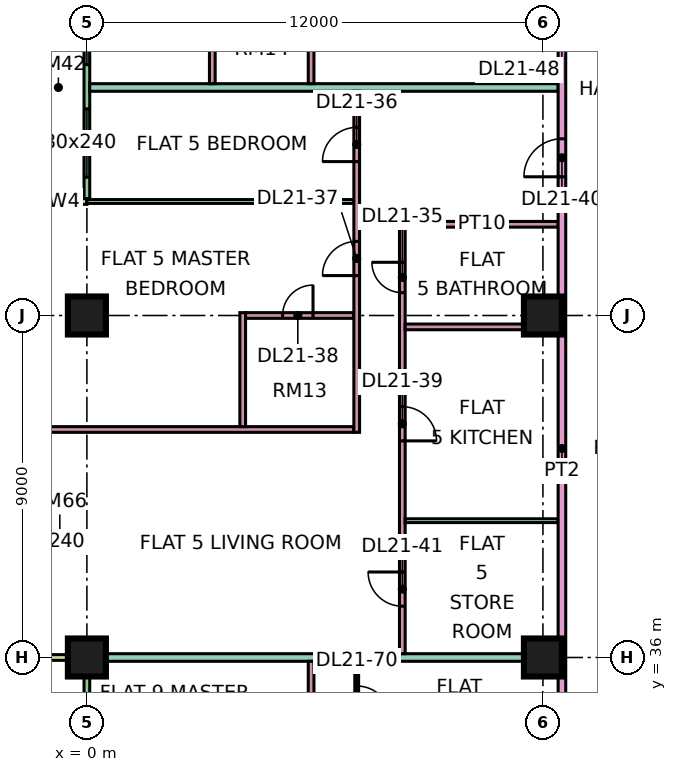
"""IFC4 building model, lengths in metres.
Left out: names, types, materials, properties, quantities, classifications, styles, units other than length and angle.
Written with IfcOpenShell. Run it as: python <this file> out.ifc"""

import sys

from ifc_helpers import new_model, si_unit, direction, frame, frame_2d, origin, origin_2d, place, context, subcontext, project, spatial, rectangle, extrude, element, fill, save


model = new_model("IFC4")
c1 = context("Model", 3, precision=1e-05, world=origin(), true_north=direction((0.0, 1.0)))
c2 = subcontext(c1, "Body", "Model", "MODEL_VIEW")
j1 = project(units=[si_unit("LENGTHUNIT", "METRE"), si_unit("PLANEANGLEUNIT", "RADIAN")], contexts=[c1])
p1 = place(None, origin())
s1 = spatial("IfcSite", under=j1, at=p1, CompositionType="ELEMENT")
p2 = place(p1, origin())
s2 = spatial("IfcBuilding", under=s1, at=p2, CompositionType="ELEMENT")
p3 = place(p2, frame((0.0, 0.0, 95.65)))
s3 = spatial("IfcBuildingStorey", under=s2, at=p3, CompositionType="ELEMENT", Elevation=95.65)
p4 = place(p3, frame((0.0, 36.0, 0.0), z_axis=(0.0, 0.0, 1.0), x_axis=(1.0, 0.0, 0.0)))
e1 = element("IfcColumn", 1, at=p4, inside=s3, PredefinedType="COLUMN", context=c2, shape_type="SweptSolid", body=[
    extrude(rectangle(XDim=1.0, YDim=1.0, at=origin_2d()), origin(), (0.0, 0.0, 1.0), 3.75),
])
for number, where, z_axis, x_axis in (
    (2, (0.0, 45.0, 0.0), (0.0, 0.0, 1.0), (1.0, 0.0, 0.0)),
    (3, (12.0, 36.0, 0.0), (0.0, 0.0, 1.0), (1.0, 0.0, 0.0)),
    (4, (12.0, 45.0, 0.0), (0.0, 0.0, 1.0), (1.0, 0.0, 0.0)),
):
    element("IfcColumn", number, at=place(p3, frame(where, z_axis=z_axis, x_axis=x_axis)), inside=s3, PredefinedType="COLUMN", context=c2, shape_type="SweptSolid", body=[
        extrude(rectangle(XDim=1.0, YDim=1.0, at=origin_2d()), origin(), (0.0, 0.0, 1.0), 3.75),
    ])
p5 = place(p3, frame((0.0, 61.425, 0.0), z_axis=(0.0, 0.0, 1.0), x_axis=(0.0, -1.0, 0.0)))
e5 = element("IfcWall", 5, at=p5, inside=s3, PredefinedType="SOLIDWALL", context=c2, shape_type="SweptSolid", body=[
    extrude(rectangle(XDim=13.35, YDim=0.15, at=frame_2d((6.675, 0.0))), origin(), (0.0, 0.0, 1.0), 3.35),
])
p6 = place(p5, frame((2.025, 0.0, 0.0)))
e6 = element("IfcOpeningElement", 6, at=p6, cuts=e5, PredefinedType="OPENING", context=c2, shape_type="SweptSolid", body=[
    extrude(rectangle(XDim=1.8, YDim=2.4, at=frame_2d((0.9, 1.2))), frame((0.0, 0.085, 0.0), z_axis=(0.0, -1.0, 0.0), x_axis=(1.0, 0.0, 0.0)), (0.0, 0.0, 1.0), 0.17),
])
p7 = place(p5, frame((5.025, 0.0, 0.45)))
e7 = element("IfcOpeningElement", 7, at=p7, cuts=e5, PredefinedType="OPENING", context=c2, shape_type="SweptSolid", body=[
    extrude(rectangle(XDim=1.2, YDim=2.4, at=frame_2d((0.6, 1.2))), frame((0.0, 0.085, 0.0), z_axis=(0.0, -1.0, 0.0), x_axis=(1.0, 0.0, 0.0)), (0.0, 0.0, 1.0), 0.17),
])
p8 = place(p5, frame((8.625, 0.0, 0.45)))
e8 = element("IfcOpeningElement", 8, at=p8, cuts=e5, PredefinedType="OPENING", context=c2, shape_type="SweptSolid", body=[
    extrude(rectangle(XDim=1.2, YDim=2.4, at=frame_2d((0.6, 1.2))), frame((0.0, 0.085, 0.0), z_axis=(0.0, -1.0, 0.0), x_axis=(1.0, 0.0, 0.0)), (0.0, 0.0, 1.0), 0.17),
])
p9 = place(p5, frame((10.988, 0.0, 0.45)))
e9 = element("IfcOpeningElement", 9, at=p9, cuts=e5, PredefinedType="OPENING", context=c2, shape_type="SweptSolid", body=[
    extrude(rectangle(XDim=1.8, YDim=2.4, at=frame_2d((0.9, 1.2))), frame((0.0, 0.085, 0.0), z_axis=(0.0, -1.0, 0.0), x_axis=(1.0, 0.0, 0.0)), (0.0, 0.0, 1.0), 0.17),
])
p10 = place(p3, frame((-1.5, 48.0, 0.0), z_axis=(0.0, 0.0, 1.0), x_axis=(1.0, 0.0, 0.0)))
e10 = element("IfcWall", 10, at=p10, inside=s3, PredefinedType="SOLIDWALL", context=c2, shape_type="SweptSolid", body=[
    extrude(rectangle(XDim=1.5, YDim=0.15, at=frame_2d((0.75, 0.0))), origin(), (0.0, 0.0, 1.0), 3.35),
])
p11 = place(p3, frame((0.0, 35.925, 0.0), z_axis=(0.0, 0.0, 1.0), x_axis=(0.0, -1.0, 0.0)))
e11 = element("IfcWall", 11, at=p11, inside=s3, PredefinedType="SOLIDWALL", context=c2, shape_type="SweptSolid", body=[
    extrude(rectangle(XDim=11.85, YDim=0.15, at=frame_2d((5.925, 0.0))), origin(), (0.0, 0.0, 1.0), 3.35),
])
p12 = place(p11, frame((2.325, 0.0, 0.0)))
e12 = element("IfcOpeningElement", 12, at=p12, cuts=e11, PredefinedType="OPENING", context=c2, shape_type="SweptSolid", body=[
    extrude(rectangle(XDim=1.8, YDim=2.4, at=frame_2d((0.9, 1.2))), frame((0.0, 0.085, 0.0), z_axis=(0.0, -1.0, 0.0), x_axis=(1.0, 0.0, 0.0)), (0.0, 0.0, 1.0), 0.17),
])
p13 = place(p11, frame((7.125, 0.0, 0.45)))
e13 = element("IfcOpeningElement", 13, at=p13, cuts=e11, PredefinedType="OPENING", context=c2, shape_type="SweptSolid", body=[
    extrude(rectangle(XDim=3.0, YDim=2.4, at=frame_2d((1.5, 1.2))), frame((0.0, 0.085, 0.0), z_axis=(0.0, -1.0, 0.0), x_axis=(1.0, 0.0, 0.0)), (0.0, 0.0, 1.0), 0.17),
])
p14 = place(p3, frame((-1.5, 36.0, 0.0), z_axis=(0.0, 0.0, 1.0), x_axis=(1.0, 0.0, 0.0)))
e14 = element("IfcWall", 14, at=p14, inside=s3, PredefinedType="SOLIDWALL", context=c2, shape_type="SweptSolid", body=[
    extrude(rectangle(XDim=1.5, YDim=0.15, at=frame_2d((0.75, 0.0))), origin(), (0.0, 0.0, 1.0), 3.35),
])
e15 = element("IfcWall", 15, at=p4, inside=s3, PredefinedType="PARTITIONING", context=c2, shape_type="SweptSolid", body=[
    extrude(rectangle(XDim=12.4, YDim=0.2, at=frame_2d((6.2, 0.0))), origin(), (0.0, 0.0, 1.0), 3.35),
])
p15 = place(p3, frame((-1.35, 42.0, 0.0), z_axis=(0.0, 0.0, 1.0), x_axis=(1.0, 0.0, 0.0)))
e16 = element("IfcWall", 16, at=p15, inside=s3, PredefinedType="PARTITIONING", context=c2, shape_type="SweptSolid", body=[
    extrude(rectangle(XDim=8.375, YDim=0.15, at=frame_2d((4.188, 0.0))), origin(), (0.0, 0.0, 1.0), 3.35),
])
p16 = place(p3, frame((0.0, 48.0, 0.0), z_axis=(0.0, 0.0, 1.0), x_axis=(1.0, 0.0, 0.0)))
e17 = element("IfcWall", 17, at=p16, inside=s3, PredefinedType="PARTITIONING", context=c2, shape_type="SweptSolid", body=[
    extrude(rectangle(XDim=7.025, YDim=0.1, at=frame_2d((3.512, 0.0))), origin(), (0.0, 0.0, 1.0), 3.35),
])
p17 = place(p3, frame((0.074, 51.0, 0.0), z_axis=(0.0, 0.0, 1.0), x_axis=(1.0, 0.0, 0.0)))
e18 = element("IfcWall", 18, at=p17, inside=s3, PredefinedType="PARTITIONING", context=c2, shape_type="SweptSolid", body=[
    extrude(rectangle(XDim=12.326, YDim=0.2, at=frame_2d((6.163, 0.0))), origin(), (0.0, 0.0, 1.0), 3.35),
])
p18 = place(p3, frame((3.3, 51.1, 0.0), z_axis=(0.0, 0.0, 1.0), x_axis=(0.0, 1.0, 0.0)))
e19 = element("IfcWall", 19, at=p18, inside=s3, PredefinedType="PARTITIONING", context=c2, shape_type="SweptSolid", body=[
    extrude(rectangle(XDim=2.975, YDim=0.15, at=frame_2d((1.487, 0.0))), origin(), (0.0, 0.0, 1.0), 3.35),
])
p19 = place(p3, frame((4.1, 42.075, 0.0), z_axis=(0.0, 0.0, 1.0), x_axis=(0.0, 1.0, 0.0)))
e20 = element("IfcWall", 20, at=p19, inside=s3, PredefinedType="PARTITIONING", context=c2, shape_type="SweptSolid", body=[
    extrude(rectangle(XDim=3.0, YDim=0.15, at=frame_2d((1.5, 0.0))), origin(), (0.0, 0.0, 1.0), 3.35),
])
p20 = place(p3, frame((4.175, 45.0, 0.0), z_axis=(0.0, 0.0, 1.0), x_axis=(1.0, 0.0, 0.0)))
e21 = element("IfcWall", 21, at=p20, inside=s3, PredefinedType="PARTITIONING", context=c2, shape_type="SweptSolid", body=[
    extrude(rectangle(XDim=2.85, YDim=0.15, at=frame_2d((1.425, 0.0))), origin(), (0.0, 0.0, 1.0), 3.35),
])
p21 = place(p20, frame((0.975, 0.0, 0.0)))
e22 = element("IfcOpeningElement", 22, at=p21, cuts=e21, PredefinedType="OPENING", context=c2, shape_type="SweptSolid", body=[
    extrude(rectangle(XDim=0.8, YDim=2.1, at=frame_2d((0.4, 1.05))), frame((0.0, 0.085, 0.0), z_axis=(0.0, -1.0, 0.0), x_axis=(1.0, 0.0, 0.0)), (0.0, 0.0, 1.0), 0.17),
])
p22 = place(p3, frame((5.9, 29.925, 0.0), z_axis=(0.0, 0.0, 1.0), x_axis=(0.0, 1.0, 0.0)))
e23 = element("IfcWall", 23, at=p22, inside=s3, PredefinedType="PARTITIONING", context=c2, shape_type="SweptSolid", body=[
    extrude(rectangle(XDim=5.975, YDim=0.15, at=frame_2d((2.987, 0.0))), origin(), (0.0, 0.0, 1.0), 3.35),
])
p23 = place(p22, frame((4.125, 0.0, 0.0)))
e24 = element("IfcOpeningElement", 24, at=p23, cuts=e23, PredefinedType="OPENING", context=c2, shape_type="SweptSolid", body=[
    extrude(rectangle(XDim=0.9, YDim=2.1, at=frame_2d((0.45, 1.05))), frame((0.0, 0.085, 0.0), z_axis=(0.0, -1.0, 0.0), x_axis=(1.0, 0.0, 0.0)), (0.0, 0.0, 1.0), 0.17),
])
p24 = place(p3, frame((5.9, 51.1, 0.0), z_axis=(0.0, 0.0, 1.0), x_axis=(0.0, 1.0, 0.0)))
e25 = element("IfcWall", 25, at=p24, inside=s3, PredefinedType="PARTITIONING", context=c2, shape_type="SweptSolid", body=[
    extrude(rectangle(XDim=8.95, YDim=0.15, at=frame_2d((4.475, 0.0))), origin(), (0.0, 0.0, 1.0), 3.35),
])
p25 = place(p24, frame((6.95, 0.0, 0.0)))
e26 = element("IfcOpeningElement", 26, at=p25, cuts=e25, PredefinedType="OPENING", context=c2, shape_type="SweptSolid", body=[
    extrude(rectangle(XDim=0.9, YDim=2.1, at=frame_2d((0.45, 1.05))), frame((0.0, 0.085, 0.0), z_axis=(0.0, -1.0, 0.0), x_axis=(1.0, 0.0, 0.0)), (0.0, 0.0, 1.0), 0.17),
])
p26 = place(p24, frame((3.95, 0.0, 0.0)))
e27 = element("IfcOpeningElement", 27, at=p26, cuts=e25, PredefinedType="OPENING", context=c2, shape_type="SweptSolid", body=[
    extrude(rectangle(XDim=0.9, YDim=2.1, at=frame_2d((0.45, 1.05))), frame((0.0, 0.085, 0.0), z_axis=(0.0, -1.0, 0.0), x_axis=(1.0, 0.0, 0.0)), (0.0, 0.0, 1.0), 0.17),
])
p27 = place(p3, frame((7.1, 33.65, 0.0), z_axis=(0.0, 0.0, 1.0), x_axis=(0.0, 1.0, 0.0)))
e28 = element("IfcWall", 28, at=p27, inside=s3, PredefinedType="PARTITIONING", context=c2, shape_type="SweptSolid", body=[
    extrude(rectangle(XDim=2.25, YDim=0.1, at=frame_2d((1.125, 0.0))), origin(), (0.0, 0.0, 1.0), 3.35),
])
p28 = place(p27, frame((0.7, 0.0, 0.0)))
e29 = element("IfcOpeningElement", 29, at=p28, cuts=e28, PredefinedType="OPENING", context=c2, shape_type="SweptSolid", body=[
    extrude(rectangle(XDim=0.9, YDim=2.1, at=frame_2d((0.45, 1.05))), frame((0.0, 0.06, 0.0), z_axis=(0.0, -1.0, 0.0), x_axis=(1.0, 0.0, 0.0)), (0.0, 0.0, 1.0), 0.12),
])
p29 = place(p3, frame((7.1, 41.925, 0.0), z_axis=(0.0, 0.0, 1.0), x_axis=(0.0, 1.0, 0.0)))
e30 = element("IfcWall", 30, at=p29, inside=s3, PredefinedType="PARTITIONING", context=c2, shape_type="SweptSolid", body=[
    extrude(rectangle(XDim=8.975, YDim=0.15, at=frame_2d((4.487, 0.0))), origin(), (0.0, 0.0, 1.0), 3.35),
])
p30 = place(p29, frame((7.125, 0.0, 0.0)))
e31 = element("IfcOpeningElement", 31, at=p30, cuts=e30, PredefinedType="OPENING", context=c2, shape_type="SweptSolid", body=[
    extrude(rectangle(XDim=0.9, YDim=2.1, at=frame_2d((0.45, 1.05))), frame((0.0, 0.085, 0.0), z_axis=(0.0, -1.0, 0.0), x_axis=(1.0, 0.0, 0.0)), (0.0, 0.0, 1.0), 0.17),
])
p31 = place(p29, frame((4.125, 0.0, 0.0)))
e32 = element("IfcOpeningElement", 32, at=p31, cuts=e30, PredefinedType="OPENING", context=c2, shape_type="SweptSolid", body=[
    extrude(rectangle(XDim=0.9, YDim=2.1, at=frame_2d((0.45, 1.05))), frame((0.0, 0.085, 0.0), z_axis=(0.0, -1.0, 0.0), x_axis=(1.0, 0.0, 0.0)), (0.0, 0.0, 1.0), 0.17),
])
p32 = place(p3, frame((8.3, 36.1, 0.0), z_axis=(0.0, 0.0, 1.0), x_axis=(0.0, 1.0, 0.0)))
e33 = element("IfcWall", 33, at=p32, inside=s3, PredefinedType="PARTITIONING", context=c2, shape_type="SweptSolid", body=[
    extrude(rectangle(XDim=11.375, YDim=0.15, at=frame_2d((5.688, 0.0))), origin(), (0.0, 0.0, 1.0), 3.35),
])
p33 = place(p32, frame((9.5, 0.0, 0.0)))
e34 = element("IfcOpeningElement", 34, at=p33, cuts=e33, PredefinedType="OPENING", context=c2, shape_type="SweptSolid", body=[
    extrude(rectangle(XDim=0.8, YDim=2.1, at=frame_2d((0.4, 1.05))), frame((0.0, 0.085, 0.0), z_axis=(0.0, -1.0, 0.0), x_axis=(1.0, 0.0, 0.0)), (0.0, 0.0, 1.0), 0.17),
])
p34 = place(p32, frame((5.6, 0.0, 0.0)))
e35 = element("IfcOpeningElement", 35, at=p34, cuts=e33, PredefinedType="OPENING", context=c2, shape_type="SweptSolid", body=[
    extrude(rectangle(XDim=0.9, YDim=2.1, at=frame_2d((0.45, 1.05))), frame((0.0, 0.085, 0.0), z_axis=(0.0, -1.0, 0.0), x_axis=(1.0, 0.0, 0.0)), (0.0, 0.0, 1.0), 0.17),
])
p35 = place(p32, frame((1.25, 0.0, 0.0)))
e36 = element("IfcOpeningElement", 36, at=p35, cuts=e33, PredefinedType="OPENING", context=c2, shape_type="SweptSolid", body=[
    extrude(rectangle(XDim=0.9, YDim=2.1, at=frame_2d((0.45, 1.05))), frame((0.0, 0.085, 0.0), z_axis=(0.0, -1.0, 0.0), x_axis=(1.0, 0.0, 0.0)), (0.0, 0.0, 1.0), 0.17),
])
p36 = place(p3, frame((8.375, 39.6, 0.0), z_axis=(0.0, 0.0, 1.0), x_axis=(1.0, 0.0, 0.0)))
e37 = element("IfcWall", 37, at=p36, inside=s3, PredefinedType="PARTITIONING", context=c2, shape_type="SweptSolid", body=[
    extrude(rectangle(XDim=4.025, YDim=0.1, at=frame_2d((2.012, 0.0))), origin(), (0.0, 0.0, 1.0), 3.35),
])
for number, where, z_axis, x_axis in (
    (38, (8.375, 44.7, 0.0), (0.0, 0.0, 1.0), (1.0, 0.0, 0.0)),
    (39, (8.375, 47.4, 0.0), (0.0, 0.0, 1.0), (1.0, 0.0, 0.0)),
):
    element("IfcWall", number, at=place(p3, frame(where, z_axis=z_axis, x_axis=x_axis)), inside=s3, PredefinedType="PARTITIONING", context=c2, shape_type="SweptSolid", body=[
        extrude(rectangle(XDim=4.025, YDim=0.15, at=frame_2d((2.012, 0.0))), origin(), (0.0, 0.0, 1.0), 3.35),
    ])
p37 = place(p3, frame((12.5, 20.0, 0.0), z_axis=(0.0, 0.0, 1.0), x_axis=(0.0, 1.0, 0.0)))
e40 = element("IfcWall", 40, at=p37, inside=s3, PredefinedType="PARTITIONING", context=c2, shape_type="SweptSolid", body=[
    extrude(rectangle(XDim=43.0, YDim=0.2, at=frame_2d((21.5, 0.0))), origin(), (0.0, 0.0, 1.0), 3.35),
])
p38 = place(p37, frame((28.65, 0.0, 0.0)))
e41 = element("IfcOpeningElement", 41, at=p38, cuts=e40, PredefinedType="OPENING", context=c2, shape_type="SweptSolid", body=[
    extrude(rectangle(XDim=1.0, YDim=2.1, at=frame_2d((0.5, 1.05))), frame((0.0, 0.11, 0.0), z_axis=(0.0, -1.0, 0.0), x_axis=(1.0, 0.0, 0.0)), (0.0, 0.0, 1.0), 0.22),
])
p39 = place(p37, frame((32.1, 0.0, 0.0)))
e42 = element("IfcOpeningElement", 42, at=p39, cuts=e40, PredefinedType="OPENING", context=c2, shape_type="SweptSolid", body=[
    extrude(rectangle(XDim=1.0, YDim=2.1, at=frame_2d((0.5, 1.05))), frame((0.0, 0.11, 0.0), z_axis=(0.0, -1.0, 0.0), x_axis=(1.0, 0.0, 0.0)), (0.0, 0.0, 1.0), 0.22),
])
p40 = place(p37, frame((0.6, 0.0, 0.0)))
e43 = element("IfcOpeningElement", 43, at=p40, cuts=e40, PredefinedType="OPENING", context=c2, shape_type="SweptSolid", body=[
    extrude(rectangle(XDim=1.2, YDim=2.1, at=frame_2d((0.6, 1.05))), frame((0.0, 0.11, 0.0), z_axis=(0.0, -1.0, 0.0), x_axis=(1.0, 0.0, 0.0)), (0.0, 0.0, 1.0), 0.22),
])
p41 = place(p37, frame((11.1, 0.0, 0.0)))
e44 = element("IfcOpeningElement", 44, at=p41, cuts=e40, PredefinedType="OPENING", context=c2, shape_type="SweptSolid", body=[
    extrude(rectangle(XDim=1.0, YDim=2.1, at=frame_2d((0.5, 1.05))), frame((0.0, 0.11, 0.0), z_axis=(0.0, -1.0, 0.0), x_axis=(1.0, 0.0, 0.0)), (0.0, 0.0, 1.0), 0.22),
])
p42 = place(p8, origin())
e45 = element("IfcWindow", 45, at=p42, inside=s3, PartitioningType="SINGLE_PANEL", PredefinedType="WINDOW", context=c2, shape_type="SweptSolid", body=[
    extrude(rectangle(XDim=1.2, YDim=2.4, at=frame_2d((0.6, 1.2))), frame((0.0, 0.03, 0.0), z_axis=(0.0, -1.0, 0.0), x_axis=(1.0, 0.0, 0.0)), (0.0, 0.0, 1.0), 0.06),
])
fill(e8, e45)
p43 = place(p9, origin())
e46 = element("IfcWindow", 46, at=p43, inside=s3, PartitioningType="SINGLE_PANEL", PredefinedType="WINDOW", context=c2, shape_type="SweptSolid", body=[
    extrude(rectangle(XDim=1.8, YDim=2.4, at=frame_2d((0.9, 1.2))), frame((0.0, 0.03, 0.0), z_axis=(0.0, -1.0, 0.0), x_axis=(1.0, 0.0, 0.0)), (0.0, 0.0, 1.0), 0.06),
])
fill(e9, e46)
p44 = place(p33, frame((0.8, 0.0, 0.0), z_axis=(0.0, 0.0, 1.0), x_axis=(-1.0, 0.0, 0.0)))
e47 = element("IfcDoor", 47, at=p44, inside=s3, OperationType="SINGLE_SWING_RIGHT", PredefinedType="DOOR", context=c2, shape_type="SweptSolid", body=[
    extrude(rectangle(XDim=0.8, YDim=2.1, at=frame_2d((0.4, 1.05))), frame((0.0, 0.025, 0.0), z_axis=(0.0, -1.0, 0.0), x_axis=(1.0, 0.0, 0.0)), (0.0, 0.0, 1.0), 0.05),
])
fill(e34, e47)
p45 = place(p30, origin())
e48 = element("IfcDoor", 48, at=p45, inside=s3, OperationType="SINGLE_SWING_LEFT", PredefinedType="DOOR", context=c2, shape_type="SweptSolid", body=[
    extrude(rectangle(XDim=0.9, YDim=2.1, at=frame_2d((0.45, 1.05))), frame((0.0, 0.025, 0.0), z_axis=(0.0, -1.0, 0.0), x_axis=(1.0, 0.0, 0.0)), (0.0, 0.0, 1.0), 0.05),
])
fill(e31, e48)
p46 = place(p31, origin())
e49 = element("IfcDoor", 49, at=p46, inside=s3, OperationType="SINGLE_SWING_LEFT", PredefinedType="DOOR", context=c2, shape_type="SweptSolid", body=[
    extrude(rectangle(XDim=0.9, YDim=2.1, at=frame_2d((0.45, 1.05))), frame((0.0, 0.025, 0.0), z_axis=(0.0, -1.0, 0.0), x_axis=(1.0, 0.0, 0.0)), (0.0, 0.0, 1.0), 0.05),
])
fill(e32, e49)
p47 = place(p21, frame((0.8, 0.0, 0.0), z_axis=(0.0, 0.0, 1.0), x_axis=(-1.0, 0.0, 0.0)))
e50 = element("IfcDoor", 50, at=p47, inside=s3, OperationType="SINGLE_SWING_RIGHT", PredefinedType="DOOR", context=c2, shape_type="SweptSolid", body=[
    extrude(rectangle(XDim=0.8, YDim=2.1, at=frame_2d((0.4, 1.05))), frame((0.0, 0.025, 0.0), z_axis=(0.0, -1.0, 0.0), x_axis=(1.0, 0.0, 0.0)), (0.0, 0.0, 1.0), 0.05),
])
fill(e22, e50)
p48 = place(p34, frame((0.9, 0.0, 0.0), z_axis=(0.0, 0.0, 1.0), x_axis=(-1.0, 0.0, 0.0)))
e51 = element("IfcDoor", 51, at=p48, inside=s3, OperationType="SINGLE_SWING_LEFT", PredefinedType="DOOR", context=c2, shape_type="SweptSolid", body=[
    extrude(rectangle(XDim=0.9, YDim=2.1, at=frame_2d((0.45, 1.05))), frame((0.0, 0.025, 0.0), z_axis=(0.0, -1.0, 0.0), x_axis=(1.0, 0.0, 0.0)), (0.0, 0.0, 1.0), 0.05),
])
fill(e35, e51)
p49 = place(p38, origin())
e52 = element("IfcDoor", 52, at=p49, inside=s3, OperationType="SINGLE_SWING_LEFT", PredefinedType="DOOR", context=c2, shape_type="SweptSolid", body=[
    extrude(rectangle(XDim=1.0, YDim=2.1, at=frame_2d((0.5, 1.05))), frame((0.0, 0.025, 0.0), z_axis=(0.0, -1.0, 0.0), x_axis=(1.0, 0.0, 0.0)), (0.0, 0.0, 1.0), 0.05),
])
fill(e41, e52)
p50 = place(p35, frame((0.9, 0.0, 0.0), z_axis=(0.0, 0.0, 1.0), x_axis=(-1.0, 0.0, 0.0)))
e53 = element("IfcDoor", 53, at=p50, inside=s3, OperationType="SINGLE_SWING_RIGHT", PredefinedType="DOOR", context=c2, shape_type="SweptSolid", body=[
    extrude(rectangle(XDim=0.9, YDim=2.1, at=frame_2d((0.45, 1.05))), frame((0.0, 0.025, 0.0), z_axis=(0.0, -1.0, 0.0), x_axis=(1.0, 0.0, 0.0)), (0.0, 0.0, 1.0), 0.05),
])
fill(e36, e53)
p51 = place(p28, frame((0.9, 0.0, 0.0), z_axis=(0.0, 0.0, 1.0), x_axis=(-1.0, 0.0, 0.0)))
e54 = element("IfcDoor", 54, at=p51, inside=s3, OperationType="SINGLE_SWING_LEFT", PredefinedType="DOOR", context=c2, shape_type="SweptSolid", body=[
    extrude(rectangle(XDim=0.9, YDim=2.1, at=frame_2d((0.45, 1.05))), frame((0.0, 0.025, 0.0), z_axis=(0.0, -1.0, 0.0), x_axis=(1.0, 0.0, 0.0)), (0.0, 0.0, 1.0), 0.05),
])
fill(e29, e54)
save(model, sys.argv[1])
